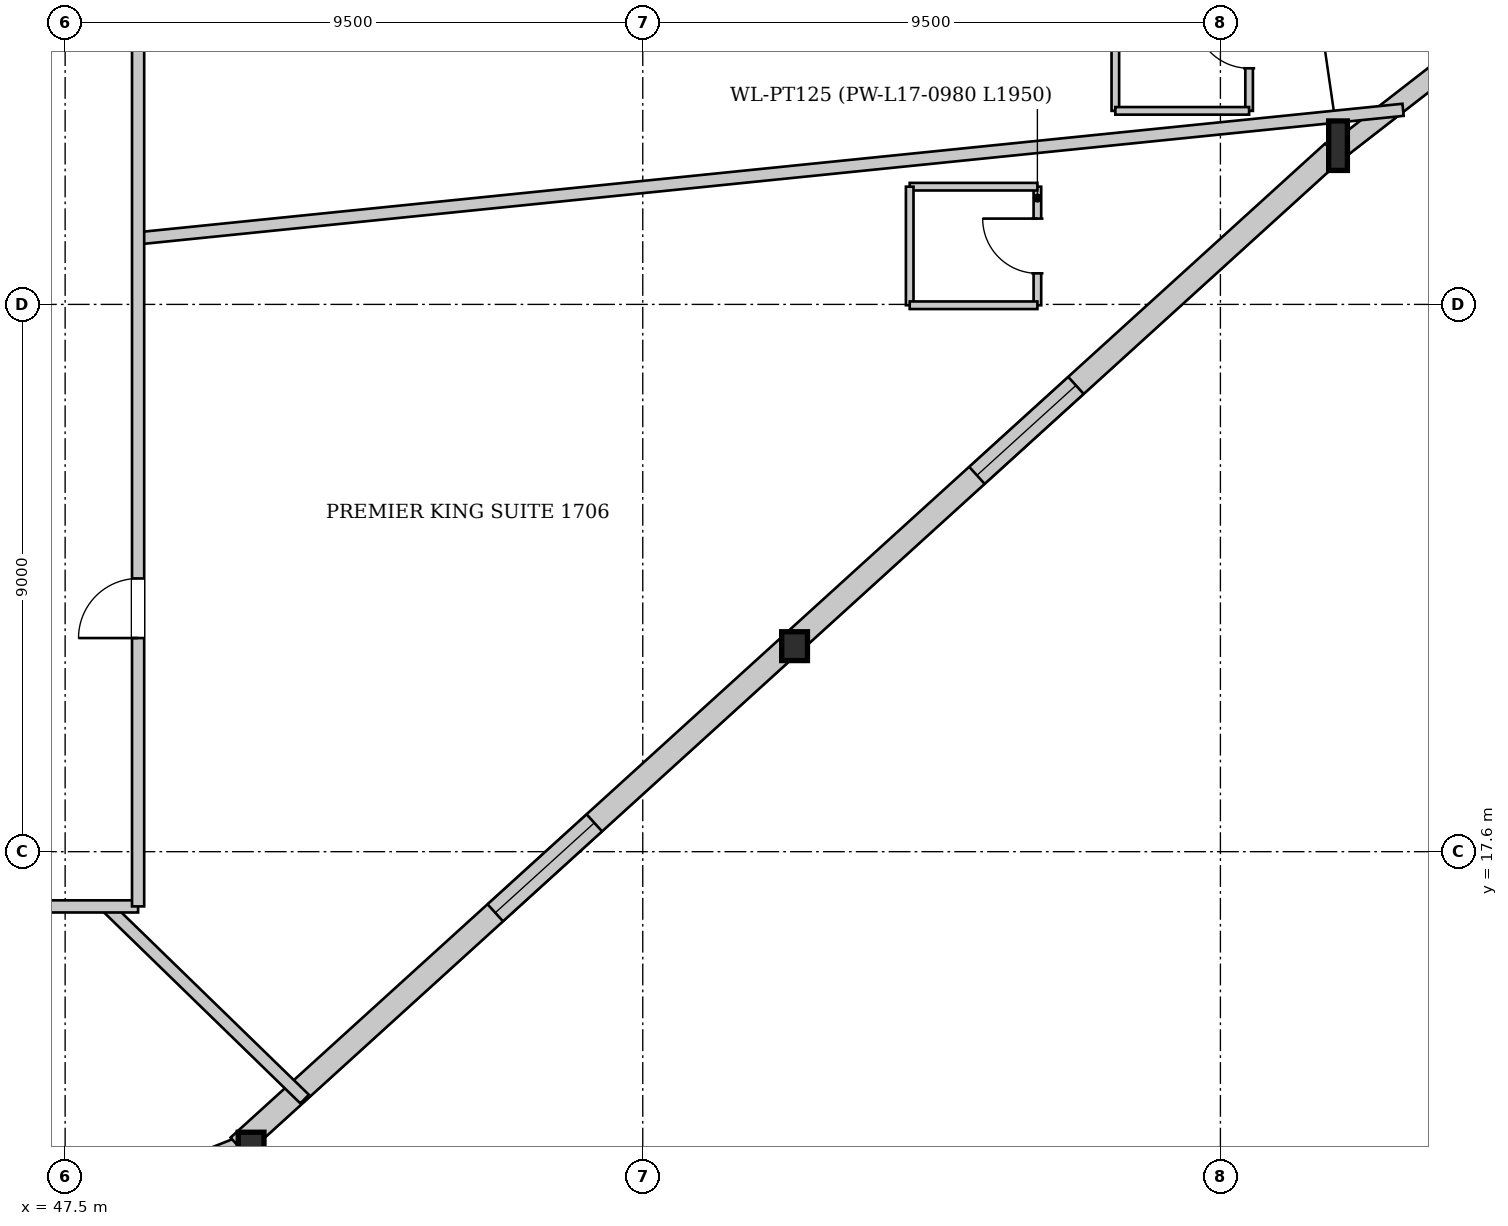
"""IFC4 building model, lengths in metres.
Left out: names, types, materials, properties, quantities, classifications, styles, units other than length and angle.
Written with IfcOpenShell. Run it as: python <this file> out.ifc"""

import sys

from ifc_helpers import new_model, si_unit, direction, frame, frame_2d, origin, origin_2d, place, context, subcontext, project, spatial, rectangle, i_section, extrude, source, transform, mapped, element, fill, save


model = new_model("IFC4")
c1 = context("Model", 3, precision=1e-05, world=origin(), true_north=direction((0.0, 1.0)))
c2 = subcontext(c1, "Body", "Model", "MODEL_VIEW")
j1 = project(units=[si_unit("LENGTHUNIT", "METRE"), si_unit("PLANEANGLEUNIT", "RADIAN")], contexts=[c1])
p1 = place(None, origin())
s1 = spatial("IfcSite", under=j1, at=p1, CompositionType="ELEMENT")
p2 = place(p1, origin())
s2 = spatial("IfcBuilding", under=s1, at=p2, CompositionType="ELEMENT")
p3 = place(p2, frame((0.0, 0.0, 68.35)))
s3 = spatial("IfcBuildingStorey", under=s2, at=p3, CompositionType="ELEMENT", Elevation=68.35)
m1 = source(origin(), c2, "Body", "SweptSolid", [
    extrude(i_section(OverallWidth=0.308, OverallDepth=0.814, WebThickness=0.021, FlangeThickness=0.04, at=origin_2d()), origin(), (0.0, 0.0, 1.0), 3.421),
])
p4 = place(p3, frame((68.478, 28.965, 0.0), z_axis=(-0.02561704692, 0.143212850053, 0.989360321868), x_axis=(-0.984376000373, -0.176079214815, 0.0)))
e1 = element("IfcColumn", 1, at=p4, inside=s3, PredefinedType="COLUMN", context=c2, shape_type="MappedRepresentation", body=[
    mapped(m1, transform((0.0, 0.0, 0.0), x_axis=(1.0, 0.0, 0.0), y_axis=(0.0, 1.0, 0.0), z_axis=(0.0, 0.0, 1.0), scale=1.0)),
])
m2 = source(origin(), c2, "Body", "SweptSolid", [
    extrude(i_section(OverallWidth=0.424, OverallDepth=0.474, WebThickness=0.043, FlangeThickness=0.068, at=origin_2d()), origin(), (0.0, 0.0, 1.0), 3.399),
])
p5 = place(p3, frame((50.476, 12.617, 0.0), z_axis=(0.048621314861, 0.077995196364, 0.995767401096), x_axis=(-0.848612326761, 0.529015235007, 0.0)))
e2 = element("IfcColumn", 2, at=p5, inside=s3, PredefinedType="COLUMN", context=c2, shape_type="MappedRepresentation", body=[
    mapped(m2, transform((0.0, 0.0, 0.0), x_axis=(1.0, 0.0, 0.0), y_axis=(0.0, 1.0, 0.0), z_axis=(0.0, 0.0, 1.0), scale=1.0)),
])
m3 = source(origin(), c2, "Body", "SweptSolid", [
    extrude(i_section(OverallWidth=0.424, OverallDepth=0.474, WebThickness=0.043, FlangeThickness=0.068, at=origin_2d()), origin(), (0.0, 0.0, 1.0), 3.406),
])
p6 = place(p3, frame((59.477, 20.791, 0.0), z_axis=(0.011396352652, 0.110809818868, 0.993776286288), x_axis=(-0.994752932951, 0.102306414191, 0.0)))
e3 = element("IfcColumn", 3, at=p6, inside=s3, PredefinedType="COLUMN", context=c2, shape_type="MappedRepresentation", body=[
    mapped(m3, transform((0.0, 0.0, 0.0), x_axis=(1.0, 0.0, 0.0), y_axis=(0.0, 1.0, 0.0), z_axis=(0.0, 0.0, 1.0), scale=1.0)),
])
p7 = place(p3, frame((50.417, 12.765, 0.0), z_axis=(0.0, 0.0, 1.0), x_axis=(-0.929420161731, -0.369023255322, 0.0)))
e4 = element("IfcWall", 4, at=p7, inside=s3, PredefinedType="SOLIDWALL", context=c2, shape_type="SweptSolid", body=[
    extrude(rectangle(XDim=24.318, YDim=0.32, at=frame_2d((12.159, 0.0))), origin(), (0.0, 0.0, 1.0), 2.592),
])
p8 = place(p7, frame((7.232, 0.0, 0.0)))
e5 = element("IfcOpeningElement", 5, at=p8, cuts=e4, PredefinedType="OPENING", context=c2, shape_type="SweptSolid", body=[
    extrude(rectangle(XDim=1.1, YDim=2.3, at=frame_2d((0.55, 1.15))), frame((0.0, 0.17, 0.0), z_axis=(0.0, -1.0, 0.0), x_axis=(1.0, 0.0, 0.0)), (0.0, 0.0, 1.0), 0.34),
])
p9 = place(p7, frame((18.195, 0.0, 0.272)))
e6 = element("IfcOpeningElement", 6, at=p9, cuts=e4, PredefinedType="OPENING", context=c2, shape_type="SweptSolid", body=[
    extrude(rectangle(XDim=1.8, YDim=2.2, at=frame_2d((0.9, 1.1))), frame((0.0, 0.17, 0.0), z_axis=(0.0, -1.0, 0.0), x_axis=(1.0, 0.0, 0.0)), (0.0, 0.0, 1.0), 0.34),
])
p10 = place(p3, frame((67.735, 33.207, 0.0), z_axis=(0.0, 0.0, 1.0), x_axis=(0.715835098873, -0.698269368669, 0.0)))
e7 = element("IfcWall", 7, at=p10, inside=s3, PredefinedType="SOLIDWALL", context=c2, shape_type="SweptSolid", body=[
    extrude(rectangle(XDim=3.864, YDim=0.32, at=frame_2d((1.932, 0.0))), origin(), (0.0, 0.0, 1.0), 2.592),
])
p11 = place(p10, frame((0.832, 0.0, 0.222)))
e8 = element("IfcOpeningElement", 8, at=p11, cuts=e7, PredefinedType="OPENING", context=c2, shape_type="SweptSolid", body=[
    extrude(rectangle(XDim=2.2, YDim=2.25, at=frame_2d((1.1, 1.125))), frame((0.0, 0.17, 0.0), z_axis=(0.0, -1.0, 0.0), x_axis=(1.0, 0.0, 0.0)), (0.0, 0.0, 1.0), 0.34),
])
p12 = place(p3, frame((70.514, 30.75, 0.0), z_axis=(0.0, 0.0, 1.0), x_axis=(-0.789595358012, -0.613627876327, 0.0)))
e9 = element("IfcWall", 9, at=p12, inside=s3, PredefinedType="SOLIDWALL", context=c2, shape_type="SweptSolid", body=[
    extrude(rectangle(XDim=2.703, YDim=0.32, at=frame_2d((1.351, 0.0))), origin(), (0.0, 0.0, 1.0), 2.592),
])
p13 = place(p3, frame((68.351, 29.106, 0.0), z_axis=(0.0, 0.0, 1.0), x_axis=(-0.740297486448, -0.672279429671, 0.0)))
e10 = element("IfcWall", 10, at=p13, inside=s3, PredefinedType="SOLIDWALL", context=c2, shape_type="SweptSolid", body=[
    extrude(rectangle(XDim=24.318, YDim=0.38, at=frame_2d((12.159, 0.0))), origin(), (0.0, 0.0, 1.0), 2.592),
])
p14 = place(p13, frame((5.709, 0.0, 0.222)))
e11 = element("IfcOpeningElement", 11, at=p14, cuts=e10, PredefinedType="OPENING", context=c2, shape_type="SweptSolid", body=[
    extrude(rectangle(XDim=2.2, YDim=2.25, at=frame_2d((1.1, 1.125))), frame((0.0, 0.2, 0.0), z_axis=(0.0, -1.0, 0.0), x_axis=(1.0, 0.0, 0.0)), (0.0, 0.0, 1.0), 0.4),
])
p15 = place(p13, frame((16.409, 0.0, 0.222)))
e12 = element("IfcOpeningElement", 12, at=p15, cuts=e10, PredefinedType="OPENING", context=c2, shape_type="SweptSolid", body=[
    extrude(rectangle(XDim=2.2, YDim=2.25, at=frame_2d((1.1, 1.125))), frame((0.0, 0.2, 0.0), z_axis=(0.0, -1.0, 0.0), x_axis=(1.0, 0.0, 0.0)), (0.0, 0.0, 1.0), 0.4),
])
p16 = place(p3, frame((48.18, 16.7, 0.0), z_axis=(0.0, 0.0, 1.0), x_axis=(0.716921827567, -0.697153564976, 0.0)))
e13 = element("IfcWall", 13, at=p16, inside=s3, PredefinedType="PARTITIONING", context=c2, shape_type="SweptSolid", body=[
    extrude(rectangle(XDim=4.545, YDim=0.2, at=frame_2d((2.272, 0.0))), origin(), (0.0, 0.0, 1.0), 3.3),
])
p17 = place(p3, frame((48.7, 27.687, 0.0), z_axis=(0.0, 0.0, 1.0), x_axis=(0.99488143762, 0.101049122113, 0.0)))
e14 = element("IfcWall", 14, at=p17, inside=s3, PredefinedType="PARTITIONING", context=c2, shape_type="SweptSolid", body=[
    extrude(rectangle(XDim=20.911, YDim=0.2, at=frame_2d((10.456, 0.0))), origin(), (0.0, 0.0, 1.0), 2.795),
])
p18 = place(p3, frame((63.49, 26.586, 0.0), z_axis=(0.0, 0.0, 1.0), x_axis=(0.0, 1.0, 0.0)))
e15 = element("IfcWall", 15, at=p18, inside=s3, PredefinedType="PARTITIONING", context=c2, shape_type="SweptSolid", body=[
    extrude(rectangle(XDim=1.95, YDim=0.125, at=frame_2d((0.975, 0.0))), origin(), (0.0, 0.0, 1.0), 3.3),
])
p19 = place(p18, frame((0.525, 0.0, 0.0)))
e16 = element("IfcOpeningElement", 16, at=p19, cuts=e15, PredefinedType="OPENING", context=c2, shape_type="SweptSolid", body=[
    extrude(rectangle(XDim=0.9, YDim=2.1, at=frame_2d((0.45, 1.05))), frame((0.0, 0.073, 0.0), z_axis=(0.0, -1.0, 0.0), x_axis=(1.0, 0.0, 0.0)), (0.0, 0.0, 1.0), 0.145),
])
p20 = place(p3, frame((63.49, 28.536, 0.0), z_axis=(0.0, 0.0, 1.0), x_axis=(-1.0, 0.0, 0.0)))
e17 = element("IfcWall", 17, at=p20, inside=s3, PredefinedType="PARTITIONING", context=c2, shape_type="SweptSolid", body=[
    extrude(rectangle(XDim=2.1, YDim=0.125, at=frame_2d((1.05, 0.0))), origin(), (0.0, 0.0, 1.0), 2.795),
])
p21 = place(p3, frame((61.39, 28.536, 0.0), z_axis=(0.0, 0.0, 1.0), x_axis=(0.0, -1.0, 0.0)))
e18 = element("IfcWall", 18, at=p21, inside=s3, PredefinedType="PARTITIONING", context=c2, shape_type="SweptSolid", body=[
    extrude(rectangle(XDim=1.95, YDim=0.125, at=frame_2d((0.975, 0.0))), origin(), (0.0, 0.0, 1.0), 3.3),
])
p22 = place(p3, frame((61.39, 26.586, 0.0), z_axis=(0.0, 0.0, 1.0), x_axis=(1.0, 0.0, 0.0)))
e19 = element("IfcWall", 19, at=p22, inside=s3, PredefinedType="PARTITIONING", context=c2, shape_type="SweptSolid", body=[
    extrude(rectangle(XDim=2.1, YDim=0.125, at=frame_2d((1.05, 0.0))), origin(), (0.0, 0.0, 1.0), 3.3),
])
p23 = place(p3, frame((66.972, 29.783, 0.0), z_axis=(0.0, 0.0, 1.0), x_axis=(0.0, 1.0, 0.0)))
e20 = element("IfcWall", 20, at=p23, inside=s3, PredefinedType="PARTITIONING", context=c2, shape_type="SweptSolid", body=[
    extrude(rectangle(XDim=2.3, YDim=0.125, at=frame_2d((1.15, 0.0))), origin(), (0.0, 0.0, 1.0), 3.3),
])
p24 = place(p23, frame((0.7, 0.0, 0.0)))
e21 = element("IfcOpeningElement", 21, at=p24, cuts=e20, PredefinedType="OPENING", context=c2, shape_type="SweptSolid", body=[
    extrude(rectangle(XDim=0.9, YDim=2.1, at=frame_2d((0.45, 1.05))), frame((0.0, 0.073, 0.0), z_axis=(0.0, -1.0, 0.0), x_axis=(1.0, 0.0, 0.0)), (0.0, 0.0, 1.0), 0.145),
])
p25 = place(p3, frame((64.772, 32.083, 0.0), z_axis=(0.0, 0.0, 1.0), x_axis=(0.0, -1.0, 0.0)))
e22 = element("IfcWall", 22, at=p25, inside=s3, PredefinedType="PARTITIONING", context=c2, shape_type="SweptSolid", body=[
    extrude(rectangle(XDim=2.3, YDim=0.125, at=frame_2d((1.15, 0.0))), origin(), (0.0, 0.0, 1.0), 3.3),
])
p26 = place(p3, frame((64.772, 29.783, 0.0), z_axis=(0.0, 0.0, 1.0), x_axis=(1.0, 0.0, 0.0)))
e23 = element("IfcWall", 23, at=p26, inside=s3, PredefinedType="PARTITIONING", context=c2, shape_type="SweptSolid", body=[
    extrude(rectangle(XDim=2.2, YDim=0.125, at=frame_2d((1.1, 0.0))), origin(), (0.0, 0.0, 1.0), 3.3),
])
p27 = place(p3, frame((27.3, 16.7, 0.0), z_axis=(0.0, 0.0, 1.0), x_axis=(1.0, 0.0, 0.0)))
e24 = element("IfcWall", 24, at=p27, inside=s3, PredefinedType="PARTITIONING", context=c2, shape_type="SweptSolid", body=[
    extrude(rectangle(XDim=21.4, YDim=0.2, at=frame_2d((10.7, 0.0))), origin(), (0.0, 0.0, 1.0), 3.3),
])
p28 = place(p27, frame((0.494, 0.0, 0.0)))
e25 = element("IfcOpeningElement", 25, at=p28, cuts=e24, PredefinedType="OPENING", context=c2, shape_type="SweptSolid", body=[
    extrude(rectangle(XDim=0.98, YDim=2.15, at=frame_2d((0.49, 1.075))), frame((0.0, 0.11, 0.0), z_axis=(0.0, -1.0, 0.0), x_axis=(1.0, 0.0, 0.0)), (0.0, 0.0, 1.0), 0.22),
])
p29 = place(p27, frame((10.868, 0.0, 0.0)))
e26 = element("IfcOpeningElement", 26, at=p29, cuts=e24, PredefinedType="OPENING", context=c2, shape_type="SweptSolid", body=[
    extrude(rectangle(XDim=0.98, YDim=2.15, at=frame_2d((0.49, 1.075))), frame((0.0, 0.11, 0.0), z_axis=(0.0, -1.0, 0.0), x_axis=(1.0, 0.0, 0.0)), (0.0, 0.0, 1.0), 0.22),
])
p30 = place(p3, frame((48.7, 16.7, 0.0), z_axis=(0.0, 0.0, 1.0), x_axis=(0.0, 1.0, 0.0)))
e27 = element("IfcWall", 27, at=p30, inside=s3, PredefinedType="PARTITIONING", context=c2, shape_type="SweptSolid", body=[
    extrude(rectangle(XDim=19.8, YDim=0.2, at=frame_2d((9.9, 0.0))), origin(), (0.0, 0.0, 1.0), 3.3),
])
p31 = place(p30, frame((4.413, 0.0, 0.0)))
e28 = element("IfcOpeningElement", 28, at=p31, cuts=e27, PredefinedType="OPENING", context=c2, shape_type="SweptSolid", body=[
    extrude(rectangle(XDim=0.98, YDim=2.15, at=frame_2d((0.49, 1.075))), frame((0.0, 0.11, 0.0), z_axis=(0.0, -1.0, 0.0), x_axis=(1.0, 0.0, 0.0)), (0.0, 0.0, 1.0), 0.22),
])
m4 = source(origin(), c2, "Body", "SweptSolid", [
    extrude(rectangle(XDim=2.2, YDim=2.25, at=frame_2d((1.1, 1.125))), frame((0.0, 0.03, 0.0), z_axis=(0.0, -1.0, 0.0), x_axis=(1.0, 0.0, 0.0)), (0.0, 0.0, 1.0), 0.06),
])
p32 = place(p14, origin())
e29 = element("IfcWindow", 29, at=p32, inside=s3, PartitioningType="SINGLE_PANEL", PredefinedType="WINDOW", context=c2, shape_type="MappedRepresentation", body=[
    mapped(m4, transform((0.0, 0.0, 0.0), x_axis=(1.0, 0.0, 0.0), y_axis=(0.0, 1.0, 0.0), z_axis=(0.0, 0.0, 1.0), scale=1.0)),
])
fill(e11, e29)
p33 = place(p15, origin())
e30 = element("IfcWindow", 30, at=p33, inside=s3, PartitioningType="SINGLE_PANEL", PredefinedType="WINDOW", context=c2, shape_type="MappedRepresentation", body=[
    mapped(m4, transform((0.0, 0.0, 0.0), x_axis=(1.0, 0.0, 0.0), y_axis=(0.0, 1.0, 0.0), z_axis=(0.0, 0.0, 1.0), scale=1.0)),
])
fill(e12, e30)
m5 = source(origin(), c2, "Body", "SweptSolid", [
    extrude(rectangle(XDim=0.9, YDim=2.1, at=frame_2d((0.45, 1.05))), frame((0.0, 0.025, 0.0), z_axis=(0.0, -1.0, 0.0), x_axis=(1.0, 0.0, 0.0)), (0.0, 0.0, 1.0), 0.05),
])
p34 = place(p19, origin())
e31 = element("IfcDoor", 31, at=p34, inside=s3, OperationType="SINGLE_SWING_RIGHT", PredefinedType="DOOR", context=c2, shape_type="MappedRepresentation", body=[
    mapped(m5, transform((0.0, 0.0, 0.0), x_axis=(1.0, 0.0, 0.0), y_axis=(0.0, 1.0, 0.0), z_axis=(0.0, 0.0, 1.0), scale=1.0)),
])
fill(e16, e31)
p35 = place(p24, origin())
e32 = element("IfcDoor", 32, at=p35, inside=s3, OperationType="SINGLE_SWING_RIGHT", PredefinedType="DOOR", context=c2, shape_type="MappedRepresentation", body=[
    mapped(m5, transform((0.0, 0.0, 0.0), x_axis=(1.0, 0.0, 0.0), y_axis=(0.0, 1.0, 0.0), z_axis=(0.0, 0.0, 1.0), scale=1.0)),
])
fill(e21, e32)
m6 = source(origin(), c2, "Body", "SweptSolid", [
    extrude(rectangle(XDim=0.98, YDim=2.15, at=frame_2d((0.49, 1.075))), frame((0.0, 0.025, 0.0), z_axis=(0.0, -1.0, 0.0), x_axis=(1.0, 0.0, 0.0)), (0.0, 0.0, 1.0), 0.05),
])
p36 = place(p31, origin())
e33 = element("IfcDoor", 33, at=p36, inside=s3, OperationType="SINGLE_SWING_LEFT", PredefinedType="DOOR", context=c2, shape_type="MappedRepresentation", body=[
    mapped(m6, transform((0.0, 0.0, 0.0), x_axis=(1.0, 0.0, 0.0), y_axis=(0.0, 1.0, 0.0), z_axis=(0.0, 0.0, 1.0), scale=1.0)),
])
fill(e28, e33)
save(model, sys.argv[1])
